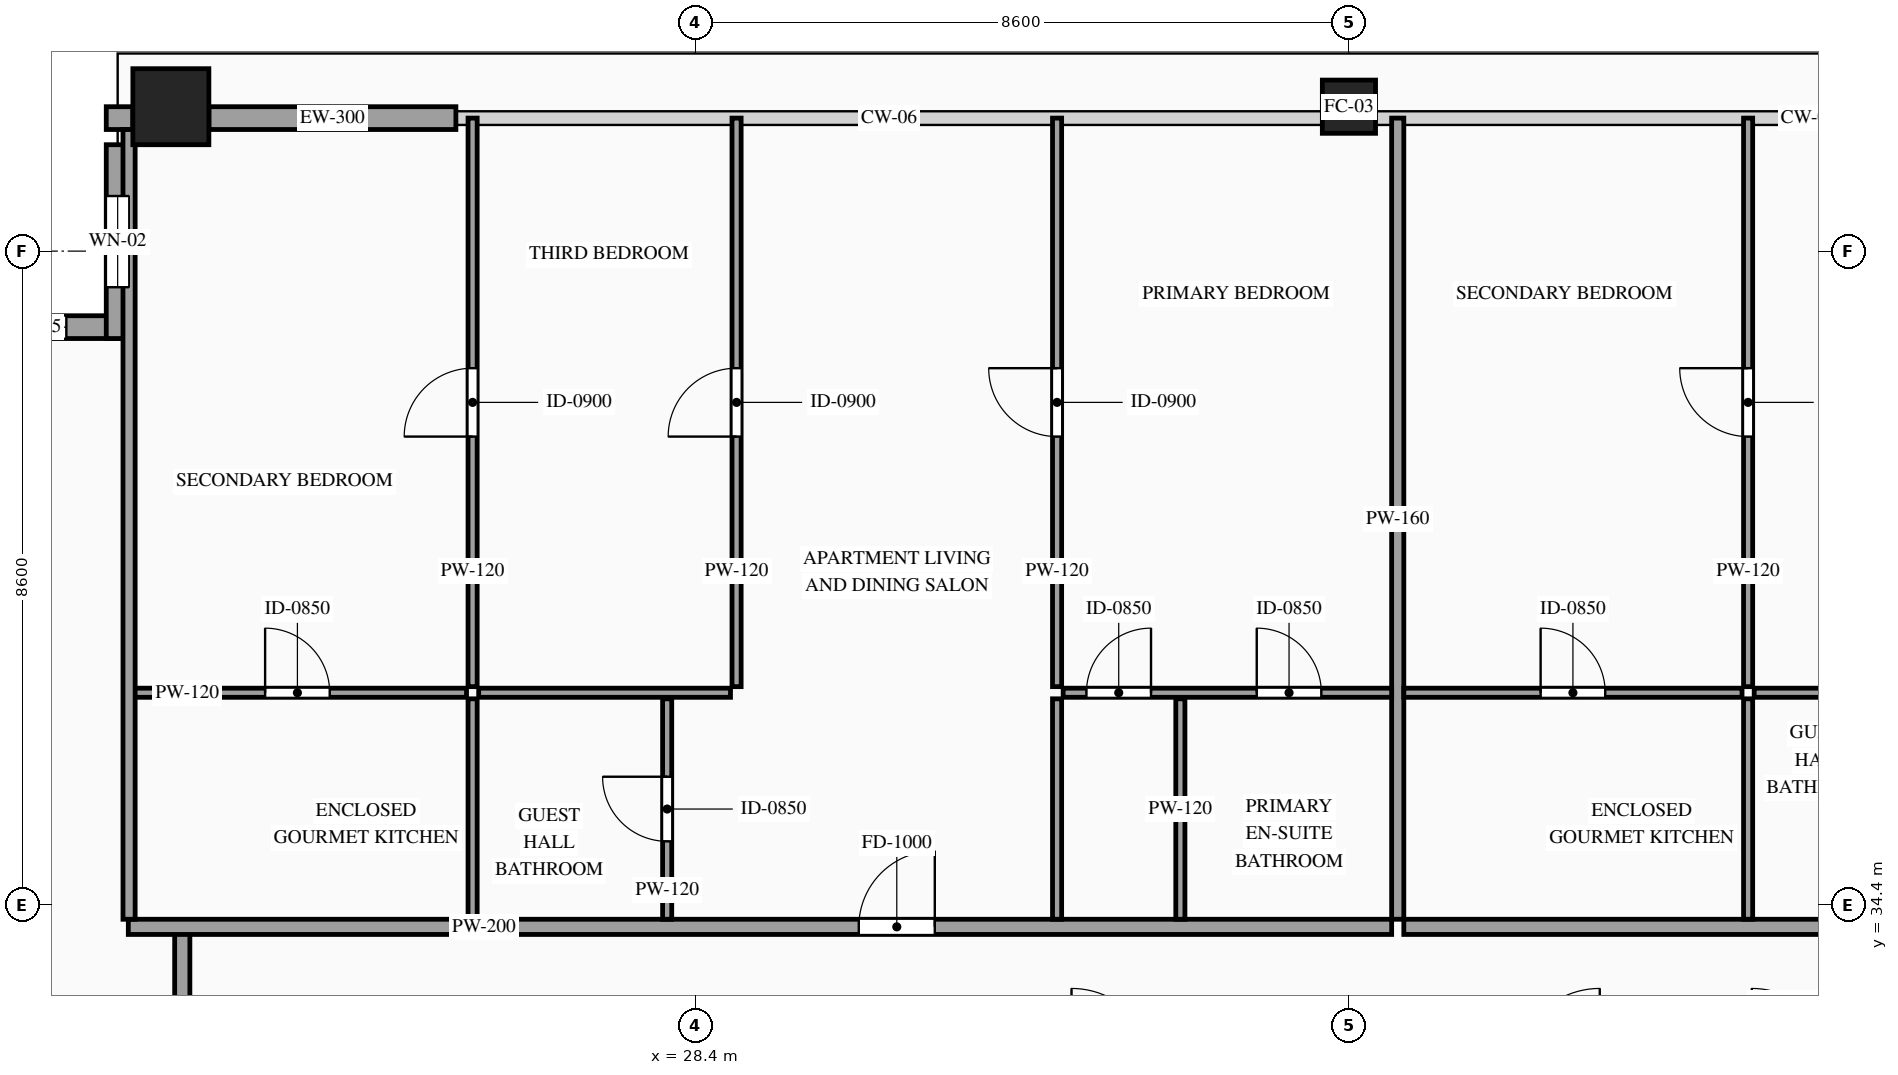
"""IFC4 building model, lengths in metres.
Left out: names, types, materials, properties, quantities, classifications, styles, units other than length and angle.
Written with IfcOpenShell. Run it as: python <this file> out.ifc"""

import sys

from ifc_helpers import new_model, si_unit, direction, frame, frame_2d, origin, origin_2d, place, context, subcontext, project, spatial, rectangle, hollow_rectangle, extrude, source, transform, mapped, element, fill, save


model = new_model("IFC4")
c1 = context("Model", 3, precision=1e-05, world=origin(), true_north=direction((0.0, 1.0)))
c2 = subcontext(c1, "Body", "Model", "MODEL_VIEW")
j1 = project(units=[si_unit("LENGTHUNIT", "METRE"), si_unit("PLANEANGLEUNIT", "RADIAN")], contexts=[c1])
p1 = place(None, origin())
s1 = spatial("IfcSite", under=j1, at=p1, CompositionType="ELEMENT")
p2 = place(p1, origin())
s2 = spatial("IfcBuilding", under=s1, at=p2, CompositionType="ELEMENT")
p3 = place(p2, frame((0.0, 0.0, 289.1)))
s3 = spatial("IfcBuildingStorey", under=s2, at=p3, CompositionType="ELEMENT", Elevation=289.1)
m1 = source(origin(), c2, "Body", "SweptSolid", [
    extrude(hollow_rectangle(XDim=1.0, YDim=1.0, WallThickness=0.048, at=origin_2d()), origin(), (0.0, 0.0, 1.0), 3.5),
])
p4 = place(p3, frame((21.5, 44.9, 0.0), z_axis=(0.0, 0.0, 1.0), x_axis=(1.0, 0.0, 0.0)))
e1 = element("IfcColumn", 1, at=p4, inside=s3, PredefinedType="COLUMN", context=c2, shape_type="MappedRepresentation", body=[
    mapped(m1, transform((0.0, 0.0, 0.0), scale=1.0)),
])
m2 = source(origin(), c2, "Body", "SweptSolid", [
    extrude(hollow_rectangle(XDim=0.7, YDim=0.7, WallThickness=0.032, at=origin_2d()), origin(), (0.0, 0.0, 1.0), 3.5),
])
p5 = place(p3, frame((37.0, 44.9, 0.0), z_axis=(0.0, 0.0, 1.0), x_axis=(1.0, 0.0, 0.0)))
e2 = element("IfcColumn", 2, at=p5, inside=s3, PredefinedType="COLUMN", context=c2, shape_type="MappedRepresentation", body=[
    mapped(m2, transform((0.0, 0.0, 0.0), scale=1.0)),
])
p6 = place(p3, frame((20.95, 42.0, 0.0), z_axis=(0.0, 0.0, 1.0), x_axis=(-1.0, 0.0, 0.0)))
e3 = element("IfcWall", 3, at=p6, inside=s3, PredefinedType="SOLIDWALL", context=c2, shape_type="SweptSolid", body=[
    extrude(rectangle(XDim=2.55, YDim=0.3, at=frame_2d((1.275, 0.0))), origin(), (0.0, 0.0, 1.0), 3.28),
])
p7 = place(p6, frame((0.825, 0.0, 0.85)))
e4 = element("IfcOpeningElement", 4, at=p7, cuts=e3, PredefinedType="OPENING", context=c2, shape_type="SweptSolid", body=[
    extrude(rectangle(XDim=0.9, YDim=1.5, at=frame_2d((0.45, 0.75))), frame((0.0, 0.165, 0.0), z_axis=(0.0, -1.0, 0.0), x_axis=(1.0, 0.0, 0.0)), (0.0, 0.0, 1.0), 0.33),
])
p8 = place(p3, frame((20.8, 44.4, 0.0), z_axis=(0.0, 0.0, 1.0), x_axis=(0.0, -1.0, 0.0)))
e5 = element("IfcWall", 5, at=p8, inside=s3, PredefinedType="SOLIDWALL", context=c2, shape_type="SweptSolid", body=[
    extrude(rectangle(XDim=2.55, YDim=0.3, at=frame_2d((1.275, 0.0))), origin(), (0.0, 0.0, 1.0), 3.28),
])
p9 = place(p8, frame((0.675, 0.0, 0.85)))
e6 = element("IfcOpeningElement", 6, at=p9, cuts=e5, PredefinedType="OPENING", context=c2, shape_type="SweptSolid", body=[
    extrude(rectangle(XDim=1.2, YDim=2.1, at=frame_2d((0.6, 1.05))), frame((0.0, 0.165, 0.0), z_axis=(0.0, -1.0, 0.0), x_axis=(1.0, 0.0, 0.0)), (0.0, 0.0, 1.0), 0.33),
])
m3 = source(origin(), c2, "Body", "SweptSolid", [
    extrude(rectangle(XDim=0.35, YDim=0.3, at=frame_2d((0.175, 0.0))), origin(), (0.0, 0.0, 1.0), 3.28),
])
p10 = place(p3, frame((20.65, 44.75, 0.0), z_axis=(0.0, 0.0, 1.0), x_axis=(1.0, 0.0, 0.0)))
e7 = element("IfcWall", 7, at=p10, inside=s3, PredefinedType="SOLIDWALL", context=c2, shape_type="MappedRepresentation", body=[
    mapped(m3, transform((0.0, 0.0, 0.0), scale=1.0)),
])
m4 = source(origin(), c2, "Body", "SweptSolid", [
    extrude(rectangle(XDim=3.25, YDim=0.3, at=frame_2d((1.625, 0.0))), origin(), (0.0, 0.0, 1.0), 2.885),
])
p11 = place(p3, frame((22.0, 44.75, 0.0), z_axis=(0.0, 0.0, 1.0), x_axis=(1.0, 0.0, 0.0)))
e8 = element("IfcWall", 8, at=p11, inside=s3, PredefinedType="SOLIDWALL", context=c2, shape_type="MappedRepresentation", body=[
    mapped(m4, transform((0.0, 0.0, 0.0), scale=1.0)),
])
m5 = source(origin(), c2, "Body", "SweptSolid", [
    extrude(rectangle(XDim=1.7, YDim=0.2, at=frame_2d((0.85, 0.0))), origin(), (0.0, 0.0, 1.0), 3.28),
])
p12 = place(p3, frame((21.65, 32.35, 0.0), z_axis=(0.0, 0.0, 1.0), x_axis=(0.0, 1.0, 0.0)))
e9 = element("IfcWall", 9, at=p12, inside=s3, PredefinedType="PARTITIONING", context=c2, shape_type="MappedRepresentation", body=[
    mapped(m5, transform((0.0, 0.0, 0.0), scale=1.0)),
])
p13 = place(p3, frame((20.94, 34.11, 0.0), z_axis=(0.0, 0.0, 1.0), x_axis=(1.0, 0.0, 0.0)))
e10 = element("IfcWall", 10, at=p13, inside=s3, PredefinedType="PARTITIONING", context=c2, shape_type="SweptSolid", body=[
    extrude(rectangle(XDim=16.622, YDim=0.2, at=frame_2d((8.311, 0.0))), origin(), (0.0, 0.0, 1.0), 3.28),
])
p14 = place(p13, frame((9.611, 0.0, 0.0)))
e11 = element("IfcOpeningElement", 11, at=p14, cuts=e10, PredefinedType="OPENING", context=c2, shape_type="SweptSolid", body=[
    extrude(rectangle(XDim=1.0, YDim=2.2, at=frame_2d((0.5, 1.1))), frame((0.0, 0.115, 0.0), z_axis=(0.0, -1.0, 0.0), x_axis=(1.0, 0.0, 0.0)), (0.0, 0.0, 1.0), 0.23),
])
m6 = source(origin(), c2, "Body", "SweptSolid", [
    extrude(rectangle(XDim=10.54, YDim=0.16, at=frame_2d((5.27, 0.0))), origin(), (0.0, 0.0, 1.0), 3.28),
])
p15 = place(p3, frame((37.642, 34.21, 0.0), z_axis=(0.0, 0.0, 1.0), x_axis=(0.0, 1.0, 0.0)))
e12 = element("IfcWall", 12, at=p15, inside=s3, PredefinedType="PARTITIONING", context=c2, shape_type="MappedRepresentation", body=[
    mapped(m6, transform((0.0, 0.0, 0.0), scale=1.0)),
])
p16 = place(p3, frame((20.94, 37.19, 0.0), z_axis=(0.0, 0.0, 1.0), x_axis=(1.0, 0.0, 0.0)))
e13 = element("IfcWall", 13, at=p16, inside=s3, PredefinedType="PARTITIONING", context=c2, shape_type="SweptSolid", body=[
    extrude(rectangle(XDim=4.45, YDim=0.12, at=frame_2d((2.225, 0.0))), origin(), (0.0, 0.0, 1.0), 3.28),
])
p17 = place(p16, frame((1.8, 0.0, 0.0)))
e14 = element("IfcOpeningElement", 14, at=p17, cuts=e13, PredefinedType="OPENING", context=c2, shape_type="SweptSolid", body=[
    extrude(rectangle(XDim=0.85, YDim=2.1, at=frame_2d((0.425, 1.05))), frame((0.0, 0.075, 0.0), z_axis=(0.0, -1.0, 0.0), x_axis=(1.0, 0.0, 0.0)), (0.0, 0.0, 1.0), 0.15),
])
m7 = source(origin(), c2, "Body", "SweptSolid", [
    extrude(rectangle(XDim=2.9, YDim=0.12, at=frame_2d((1.45, 0.0))), origin(), (0.0, 0.0, 1.0), 3.28),
])
p18 = place(p3, frame((25.47, 34.21, 0.0), z_axis=(0.0, 0.0, 1.0), x_axis=(0.0, 1.0, 0.0)))
e15 = element("IfcWall", 15, at=p18, inside=s3, PredefinedType="PARTITIONING", context=c2, shape_type="MappedRepresentation", body=[
    mapped(m7, transform((0.0, 0.0, 0.0), scale=1.0)),
])
p19 = place(p3, frame((28.03, 34.21, 0.0), z_axis=(0.0, 0.0, 1.0), x_axis=(0.0, 1.0, 0.0)))
e16 = element("IfcWall", 16, at=p19, inside=s3, PredefinedType="PARTITIONING", context=c2, shape_type="SweptSolid", body=[
    extrude(rectangle(XDim=2.9, YDim=0.12, at=frame_2d((1.45, 0.0))), origin(), (0.0, 0.0, 1.0), 3.28),
])
p20 = place(p19, frame((1.025, 0.0, 0.0)))
e17 = element("IfcOpeningElement", 17, at=p20, cuts=e16, PredefinedType="OPENING", context=c2, shape_type="SweptSolid", body=[
    extrude(rectangle(XDim=0.85, YDim=2.1, at=frame_2d((0.425, 1.05))), frame((0.0, 0.075, 0.0), z_axis=(0.0, -1.0, 0.0), x_axis=(1.0, 0.0, 0.0)), (0.0, 0.0, 1.0), 0.15),
])
for number, where, z_axis, x_axis in (
    (18, (34.782, 34.21, 0.0), (0.0, 0.0, 1.0), (0.0, 1.0, 0.0)),
    (19, (33.16, 34.21, 0.0), (0.0, 0.0, 1.0), (0.0, 1.0, 0.0)),
):
    element("IfcWall", number, at=place(p3, frame(where, z_axis=z_axis, x_axis=x_axis)), inside=s3, PredefinedType="PARTITIONING", context=c2, shape_type="MappedRepresentation", body=[
        mapped(m7, transform((0.0, 0.0, 0.0), scale=1.0)),
    ])
p21 = place(p3, frame((25.47, 37.27, 0.0), z_axis=(0.0, 0.0, 1.0), x_axis=(0.0, 1.0, 0.0)))
e20 = element("IfcWall", 20, at=p21, inside=s3, PredefinedType="PARTITIONING", context=c2, shape_type="SweptSolid", body=[
    extrude(rectangle(XDim=7.48, YDim=0.12, at=frame_2d((3.74, 0.0))), origin(), (0.0, 0.0, 1.0), 3.28),
])
p22 = place(p21, frame((3.29, 0.0, 0.0)))
e21 = element("IfcOpeningElement", 21, at=p22, cuts=e20, PredefinedType="OPENING", context=c2, shape_type="SweptSolid", body=[
    extrude(rectangle(XDim=0.9, YDim=2.15, at=frame_2d((0.45, 1.075))), frame((0.0, 0.075, 0.0), z_axis=(0.0, -1.0, 0.0), x_axis=(1.0, 0.0, 0.0)), (0.0, 0.0, 1.0), 0.15),
])
p23 = place(p3, frame((33.24, 37.19, 0.0), z_axis=(0.0, 0.0, 1.0), x_axis=(1.0, 0.0, 0.0)))
e22 = element("IfcWall", 22, at=p23, inside=s3, PredefinedType="PARTITIONING", context=c2, shape_type="SweptSolid", body=[
    extrude(rectangle(XDim=4.322, YDim=0.12, at=frame_2d((2.161, 0.0))), origin(), (0.0, 0.0, 1.0), 3.28),
])
p24 = place(p23, frame((2.547, 0.0, 0.0)))
e23 = element("IfcOpeningElement", 23, at=p24, cuts=e22, PredefinedType="OPENING", context=c2, shape_type="SweptSolid", body=[
    extrude(rectangle(XDim=0.85, YDim=2.1, at=frame_2d((0.425, 1.05))), frame((0.0, 0.075, 0.0), z_axis=(0.0, -1.0, 0.0), x_axis=(1.0, 0.0, 0.0)), (0.0, 0.0, 1.0), 0.15),
])
p25 = place(p23, frame((0.306, 0.0, 0.0)))
e24 = element("IfcOpeningElement", 24, at=p25, cuts=e22, PredefinedType="OPENING", context=c2, shape_type="SweptSolid", body=[
    extrude(rectangle(XDim=0.85, YDim=2.1, at=frame_2d((0.425, 1.05))), frame((0.0, 0.075, 0.0), z_axis=(0.0, -1.0, 0.0), x_axis=(1.0, 0.0, 0.0)), (0.0, 0.0, 1.0), 0.15),
])
p26 = place(p3, frame((33.16, 37.27, 0.0), z_axis=(0.0, 0.0, 1.0), x_axis=(0.0, 1.0, 0.0)))
e25 = element("IfcWall", 25, at=p26, inside=s3, PredefinedType="PARTITIONING", context=c2, shape_type="SweptSolid", body=[
    extrude(rectangle(XDim=7.48, YDim=0.12, at=frame_2d((3.74, 0.0))), origin(), (0.0, 0.0, 1.0), 3.28),
])
p27 = place(p26, frame((3.29, 0.0, 0.0)))
e26 = element("IfcOpeningElement", 26, at=p27, cuts=e25, PredefinedType="OPENING", context=c2, shape_type="SweptSolid", body=[
    extrude(rectangle(XDim=0.9, YDim=2.15, at=frame_2d((0.45, 1.075))), frame((0.0, 0.075, 0.0), z_axis=(0.0, -1.0, 0.0), x_axis=(1.0, 0.0, 0.0)), (0.0, 0.0, 1.0), 0.15),
])
m8 = source(origin(), c2, "Body", "SweptSolid", [
    extrude(rectangle(XDim=3.313, YDim=0.12, at=frame_2d((1.656, 0.0))), origin(), (0.0, 0.0, 1.0), 3.28),
])
p28 = place(p3, frame((25.55, 37.19, 0.0), z_axis=(0.0, 0.0, 1.0), x_axis=(1.0, 0.0, 0.0)))
e27 = element("IfcWall", 27, at=p28, inside=s3, PredefinedType="PARTITIONING", context=c2, shape_type="MappedRepresentation", body=[
    mapped(m8, transform((0.0, 0.0, 0.0), scale=1.0)),
])
p29 = place(p3, frame((28.943, 37.27, 0.0), z_axis=(0.0, 0.0, 1.0), x_axis=(0.0, 1.0, 0.0)))
e28 = element("IfcWall", 28, at=p29, inside=s3, PredefinedType="PARTITIONING", context=c2, shape_type="SweptSolid", body=[
    extrude(rectangle(XDim=7.48, YDim=0.12, at=frame_2d((3.74, 0.0))), origin(), (0.0, 0.0, 1.0), 3.28),
])
p30 = place(p29, frame((3.29, 0.0, 0.0)))
e29 = element("IfcOpeningElement", 29, at=p30, cuts=e28, PredefinedType="OPENING", context=c2, shape_type="SweptSolid", body=[
    extrude(rectangle(XDim=0.9, YDim=2.15, at=frame_2d((0.45, 1.075))), frame((0.0, 0.075, 0.0), z_axis=(0.0, -1.0, 0.0), x_axis=(1.0, 0.0, 0.0)), (0.0, 0.0, 1.0), 0.15),
])
p31 = place(p3, frame((37.722, 34.11, 0.0), z_axis=(0.0, 0.0, 1.0), x_axis=(1.0, 0.0, 0.0)))
e30 = element("IfcWall", 30, at=p31, inside=s3, PredefinedType="PARTITIONING", context=c2, shape_type="SweptSolid", body=[
    extrude(rectangle(XDim=15.338, YDim=0.2, at=frame_2d((7.669, 0.0))), origin(), (0.0, 0.0, 1.0), 3.28),
])
p32 = place(p31, frame((7.597, 0.0, 0.0)))
e31 = element("IfcOpeningElement", 31, at=p32, cuts=e30, PredefinedType="OPENING", context=c2, shape_type="SweptSolid", body=[
    extrude(rectangle(XDim=1.0, YDim=2.2, at=frame_2d((0.5, 1.1))), frame((0.0, 0.115, 0.0), z_axis=(0.0, -1.0, 0.0), x_axis=(1.0, 0.0, 0.0)), (0.0, 0.0, 1.0), 0.23),
])
m9 = source(origin(), c2, "Body", "SweptSolid", [
    extrude(rectangle(XDim=10.39, YDim=0.16, at=frame_2d((5.195, 0.0))), origin(), (0.0, 0.0, 1.0), 3.28),
])
p33 = place(p3, frame((20.95, 34.21, 0.0), z_axis=(0.0, 0.0, 1.0), x_axis=(0.0, 1.0, 0.0)))
e32 = element("IfcWall", 32, at=p33, inside=s3, PredefinedType="PARTITIONING", context=c2, shape_type="MappedRepresentation", body=[
    mapped(m9, transform((0.0, 0.0, 0.0), scale=1.0)),
])
p34 = place(p3, frame((37.722, 37.19, 0.0), z_axis=(0.0, 0.0, 1.0), x_axis=(1.0, 0.0, 0.0)))
e33 = element("IfcWall", 33, at=p34, inside=s3, PredefinedType="PARTITIONING", context=c2, shape_type="SweptSolid", body=[
    extrude(rectangle(XDim=4.45, YDim=0.12, at=frame_2d((2.225, 0.0))), origin(), (0.0, 0.0, 1.0), 3.28),
])
p35 = place(p34, frame((1.8, 0.0, 0.0)))
e34 = element("IfcOpeningElement", 34, at=p35, cuts=e33, PredefinedType="OPENING", context=c2, shape_type="SweptSolid", body=[
    extrude(rectangle(XDim=0.85, YDim=2.1, at=frame_2d((0.425, 1.05))), frame((0.0, 0.075, 0.0), z_axis=(0.0, -1.0, 0.0), x_axis=(1.0, 0.0, 0.0)), (0.0, 0.0, 1.0), 0.15),
])
p36 = place(p3, frame((42.252, 34.21, 0.0), z_axis=(0.0, 0.0, 1.0), x_axis=(0.0, 1.0, 0.0)))
e35 = element("IfcWall", 35, at=p36, inside=s3, PredefinedType="PARTITIONING", context=c2, shape_type="MappedRepresentation", body=[
    mapped(m7, transform((0.0, 0.0, 0.0), scale=1.0)),
])
p37 = place(p3, frame((42.252, 37.27, 0.0), z_axis=(0.0, 0.0, 1.0), x_axis=(0.0, 1.0, 0.0)))
e36 = element("IfcWall", 36, at=p37, inside=s3, PredefinedType="PARTITIONING", context=c2, shape_type="SweptSolid", body=[
    extrude(rectangle(XDim=7.48, YDim=0.12, at=frame_2d((3.74, 0.0))), origin(), (0.0, 0.0, 1.0), 3.28),
])
p38 = place(p37, frame((3.29, 0.0, 0.0)))
e37 = element("IfcOpeningElement", 37, at=p38, cuts=e36, PredefinedType="OPENING", context=c2, shape_type="SweptSolid", body=[
    extrude(rectangle(XDim=0.9, YDim=2.15, at=frame_2d((0.45, 1.075))), frame((0.0, 0.075, 0.0), z_axis=(0.0, -1.0, 0.0), x_axis=(1.0, 0.0, 0.0)), (0.0, 0.0, 1.0), 0.15),
])
m10 = source(origin(), c2, "Body", "SweptSolid", [
    extrude(rectangle(XDim=2.895, YDim=0.12, at=frame_2d((1.448, 0.0))), origin(), (0.0, 0.0, 1.0), 3.28),
])
p39 = place(p3, frame((42.332, 37.19, 0.0), z_axis=(0.0, 0.0, 1.0), x_axis=(1.0, 0.0, 0.0)))
e38 = element("IfcWall", 38, at=p39, inside=s3, PredefinedType="PARTITIONING", context=c2, shape_type="MappedRepresentation", body=[
    mapped(m10, transform((0.0, 0.0, 0.0), scale=1.0)),
])
m11 = source(origin(), c2, "Body", "SweptSolid", [
    extrude(rectangle(XDim=0.9, YDim=1.5, at=frame_2d((0.45, 0.75))), frame((0.0, 0.03, 0.0), z_axis=(0.0, -1.0, 0.0), x_axis=(1.0, 0.0, 0.0)), (0.0, 0.0, 1.0), 0.06),
])
p40 = place(p7, origin())
e39 = element("IfcWindow", 39, at=p40, inside=s3, PartitioningType="SINGLE_PANEL", PredefinedType="WINDOW", context=c2, shape_type="MappedRepresentation", body=[
    mapped(m11, transform((0.0, 0.0, 0.0), scale=1.0)),
])
fill(e4, e39)
m12 = source(origin(), c2, "Body", "SweptSolid", [
    extrude(rectangle(XDim=1.2, YDim=2.1, at=frame_2d((0.6, 1.05))), frame((0.0, 0.03, 0.0), z_axis=(0.0, -1.0, 0.0), x_axis=(1.0, 0.0, 0.0)), (0.0, 0.0, 1.0), 0.06),
])
p41 = place(p9, origin())
e40 = element("IfcWindow", 40, at=p41, inside=s3, PartitioningType="SINGLE_PANEL", PredefinedType="WINDOW", context=c2, shape_type="MappedRepresentation", body=[
    mapped(m12, transform((0.0, 0.0, 0.0), scale=1.0)),
])
fill(e6, e40)
m13 = source(origin(), c2, "Body", "SweptSolid", [
    extrude(rectangle(XDim=1.0, YDim=2.2, at=frame_2d((0.5, 1.1))), frame((0.0, 0.025, 0.0), z_axis=(0.0, -1.0, 0.0), x_axis=(1.0, 0.0, 0.0)), (0.0, 0.0, 1.0), 0.05),
])
p42 = place(p14, origin())
e41 = element("IfcDoor", 41, at=p42, inside=s3, OperationType="SINGLE_SWING_RIGHT", PredefinedType="DOOR", context=c2, shape_type="MappedRepresentation", body=[
    mapped(m13, transform((0.0, 0.0, 0.0), scale=1.0)),
])
fill(e11, e41)
m14 = source(origin(), c2, "Body", "SweptSolid", [
    extrude(rectangle(XDim=0.85, YDim=2.1, at=frame_2d((0.425, 1.05))), frame((0.0, 0.025, 0.0), z_axis=(0.0, -1.0, 0.0), x_axis=(1.0, 0.0, 0.0)), (0.0, 0.0, 1.0), 0.05),
])
p43 = place(p17, origin())
e42 = element("IfcDoor", 42, at=p43, inside=s3, OperationType="SINGLE_SWING_LEFT", PredefinedType="DOOR", context=c2, shape_type="MappedRepresentation", body=[
    mapped(m14, transform((0.0, 0.0, 0.0), scale=1.0)),
])
fill(e14, e42)
p44 = place(p20, origin())
e43 = element("IfcDoor", 43, at=p44, inside=s3, OperationType="SINGLE_SWING_RIGHT", PredefinedType="DOOR", context=c2, shape_type="MappedRepresentation", body=[
    mapped(m14, transform((0.0, 0.0, 0.0), scale=1.0)),
])
fill(e17, e43)
p45 = place(p24, origin())
e44 = element("IfcDoor", 44, at=p45, inside=s3, OperationType="SINGLE_SWING_LEFT", PredefinedType="DOOR", context=c2, shape_type="MappedRepresentation", body=[
    mapped(m14, transform((0.0, 0.0, 0.0), scale=1.0)),
])
fill(e23, e44)
p46 = place(p25, origin())
e45 = element("IfcDoor", 45, at=p46, inside=s3, OperationType="SINGLE_SWING_RIGHT", PredefinedType="DOOR", context=c2, shape_type="MappedRepresentation", body=[
    mapped(m14, transform((0.0, 0.0, 0.0), scale=1.0)),
])
fill(e24, e45)
m15 = source(origin(), c2, "Body", "SweptSolid", [
    extrude(rectangle(XDim=0.9, YDim=2.15, at=frame_2d((0.45, 1.075))), frame((0.0, 0.025, 0.0), z_axis=(0.0, -1.0, 0.0), x_axis=(1.0, 0.0, 0.0)), (0.0, 0.0, 1.0), 0.05),
])
p47 = place(p22, origin())
e46 = element("IfcDoor", 46, at=p47, inside=s3, OperationType="SINGLE_SWING_LEFT", PredefinedType="DOOR", context=c2, shape_type="MappedRepresentation", body=[
    mapped(m15, transform((0.0, 0.0, 0.0), scale=1.0)),
])
fill(e21, e46)
p48 = place(p27, origin())
e47 = element("IfcDoor", 47, at=p48, inside=s3, OperationType="SINGLE_SWING_RIGHT", PredefinedType="DOOR", context=c2, shape_type="MappedRepresentation", body=[
    mapped(m15, transform((0.0, 0.0, 0.0), scale=1.0)),
])
fill(e26, e47)
p49 = place(p30, origin())
e48 = element("IfcDoor", 48, at=p49, inside=s3, OperationType="SINGLE_SWING_LEFT", PredefinedType="DOOR", context=c2, shape_type="MappedRepresentation", body=[
    mapped(m15, transform((0.0, 0.0, 0.0), scale=1.0)),
])
fill(e29, e48)
p50 = place(p35, origin())
e49 = element("IfcDoor", 49, at=p50, inside=s3, OperationType="SINGLE_SWING_LEFT", PredefinedType="DOOR", context=c2, shape_type="MappedRepresentation", body=[
    mapped(m14, transform((0.0, 0.0, 0.0), scale=1.0)),
])
fill(e34, e49)
p51 = place(p38, origin())
e50 = element("IfcDoor", 50, at=p51, inside=s3, OperationType="SINGLE_SWING_RIGHT", PredefinedType="DOOR", context=c2, shape_type="MappedRepresentation", body=[
    mapped(m15, transform((0.0, 0.0, 0.0), scale=1.0)),
])
fill(e37, e50)
save(model, sys.argv[1])
